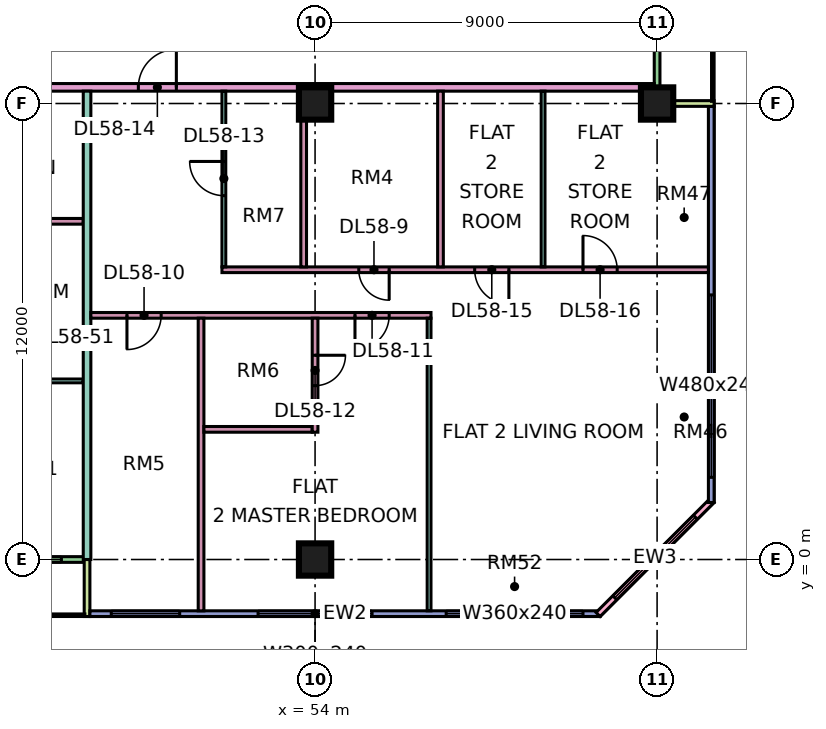
"""IFC4 building model, lengths in metres.
Left out: names, types, materials, properties, quantities, classifications, styles, units other than length and angle.
Written with IfcOpenShell. Run it as: python <this file> out.ifc"""

import sys

from ifc_helpers import new_model, si_unit, direction, frame, frame_2d, origin, origin_2d, place, context, subcontext, project, spatial, rectangle, extrude, element, fill, save


model = new_model("IFC4")
c1 = context("Model", 3, precision=1e-05, world=origin(), true_north=direction((0.0, 1.0)))
c2 = subcontext(c1, "Body", "Model", "MODEL_VIEW")
j1 = project(units=[si_unit("LENGTHUNIT", "METRE"), si_unit("PLANEANGLEUNIT", "RADIAN")], contexts=[c1])
p1 = place(None, origin())
s1 = spatial("IfcSite", under=j1, at=p1, CompositionType="ELEMENT")
p2 = place(p1, origin())
s2 = spatial("IfcBuilding", under=s1, at=p2, CompositionType="ELEMENT")
p3 = place(p2, frame((0.0, 0.0, 245.4)))
s3 = spatial("IfcBuildingStorey", under=s2, at=p3, CompositionType="ELEMENT", Elevation=245.4)
for number, where, z_axis, x_axis in (
    (1, (54.0, 0.0, 0.0), (0.0, 0.0, 1.0), (1.0, 0.0, 0.0)),
    (2, (54.0, 12.0, 0.0), (0.0, 0.0, 1.0), (1.0, 0.0, 0.0)),
    (3, (63.0, 12.0, 0.0), (0.0, 0.0, 1.0), (1.0, 0.0, 0.0)),
):
    element("IfcColumn", number, at=place(p3, frame(where, z_axis=z_axis, x_axis=x_axis)), inside=s3, PredefinedType="COLUMN", context=c2, shape_type="SweptSolid", body=[
        extrude(rectangle(XDim=0.85, YDim=0.85, at=origin_2d()), origin(), (0.0, 0.0, 1.0), 3.75),
    ])
p4 = place(p3, frame((36.075, 0.0, 0.0), z_axis=(0.0, 0.0, 1.0), x_axis=(1.0, 0.0, 0.0)))
e4 = element("IfcWall", 4, at=p4, inside=s3, PredefinedType="SOLIDWALL", context=c2, shape_type="SweptSolid", body=[
    extrude(rectangle(XDim=11.85, YDim=0.15, at=frame_2d((5.925, 0.0))), origin(), (0.0, 0.0, 1.0), 3.35),
])
p5 = place(p4, frame((2.288, 0.0, 0.0)))
e5 = element("IfcOpeningElement", 5, at=p5, cuts=e4, PredefinedType="OPENING", context=c2, shape_type="SweptSolid", body=[
    extrude(rectangle(XDim=1.8, YDim=2.4, at=frame_2d((0.9, 1.2))), frame((0.0, 0.085, 0.0), z_axis=(0.0, -1.0, 0.0), x_axis=(1.0, 0.0, 0.0)), (0.0, 0.0, 1.0), 0.17),
])
p6 = place(p4, frame((6.562, 0.0, 0.45)))
e6 = element("IfcOpeningElement", 6, at=p6, cuts=e4, PredefinedType="OPENING", context=c2, shape_type="SweptSolid", body=[
    extrude(rectangle(XDim=1.2, YDim=2.4, at=frame_2d((0.6, 1.2))), frame((0.0, 0.085, 0.0), z_axis=(0.0, -1.0, 0.0), x_axis=(1.0, 0.0, 0.0)), (0.0, 0.0, 1.0), 0.17),
])
p7 = place(p4, frame((10.05, 0.0, 0.45)))
e7 = element("IfcOpeningElement", 7, at=p7, cuts=e4, PredefinedType="OPENING", context=c2, shape_type="SweptSolid", body=[
    extrude(rectangle(XDim=1.2, YDim=2.4, at=frame_2d((0.6, 1.2))), frame((0.0, 0.085, 0.0), z_axis=(0.0, -1.0, 0.0), x_axis=(1.0, 0.0, 0.0)), (0.0, 0.0, 1.0), 0.17),
])
p8 = place(p3, frame((48.0, -1.5, 0.0), z_axis=(0.0, 0.0, 1.0), x_axis=(0.0, 1.0, 0.0)))
e8 = element("IfcWall", 8, at=p8, inside=s3, PredefinedType="SOLIDWALL", context=c2, shape_type="SweptSolid", body=[
    extrude(rectangle(XDim=1.5, YDim=0.15, at=frame_2d((0.75, 0.0))), origin(), (0.0, 0.0, 1.0), 3.35),
])
p9 = place(p3, frame((48.075, -1.425, 0.0), z_axis=(0.0, 0.0, 1.0), x_axis=(1.0, 0.0, 0.0)))
e9 = element("IfcWall", 9, at=p9, inside=s3, PredefinedType="SOLIDWALL", context=c2, shape_type="SweptSolid", body=[
    extrude(rectangle(XDim=13.425, YDim=0.15, at=frame_2d((6.712, 0.0))), origin(), (0.0, 0.0, 1.0), 3.35),
])
p10 = place(p9, frame((0.562, 0.0, 0.45)))
e10 = element("IfcOpeningElement", 10, at=p10, cuts=e9, PredefinedType="OPENING", context=c2, shape_type="SweptSolid", body=[
    extrude(rectangle(XDim=1.8, YDim=2.4, at=frame_2d((0.9, 1.2))), frame((0.0, 0.085, 0.0), z_axis=(0.0, -1.0, 0.0), x_axis=(1.0, 0.0, 0.0)), (0.0, 0.0, 1.0), 0.17),
])
p11 = place(p9, frame((4.425, 0.0, 0.45)))
e11 = element("IfcOpeningElement", 11, at=p11, cuts=e9, PredefinedType="OPENING", context=c2, shape_type="SweptSolid", body=[
    extrude(rectangle(XDim=3.0, YDim=2.4, at=frame_2d((1.5, 1.2))), frame((0.0, 0.085, 0.0), z_axis=(0.0, -1.0, 0.0), x_axis=(1.0, 0.0, 0.0)), (0.0, 0.0, 1.0), 0.17),
])
p12 = place(p9, frame((9.375, 0.0, 0.45)))
e12 = element("IfcOpeningElement", 12, at=p12, cuts=e9, PredefinedType="OPENING", context=c2, shape_type="SweptSolid", body=[
    extrude(rectangle(XDim=3.6, YDim=2.4, at=frame_2d((1.8, 1.2))), frame((0.0, 0.085, 0.0), z_axis=(0.0, -1.0, 0.0), x_axis=(1.0, 0.0, 0.0)), (0.0, 0.0, 1.0), 0.17),
])
p13 = place(p3, frame((61.447, -1.447, 0.0), z_axis=(0.0, 0.0, 1.0), x_axis=(0.707106781187, 0.707106781187, 0.0)))
e13 = element("IfcWall", 13, at=p13, inside=s3, PredefinedType="SOLIDWALL", context=c2, shape_type="SweptSolid", body=[
    extrude(rectangle(XDim=4.243, YDim=0.15, at=frame_2d((2.121, 0.0))), origin(), (0.0, 0.0, 1.0), 3.35),
])
p14 = place(p13, frame((0.621, 0.0, 0.45)))
e14 = element("IfcOpeningElement", 14, at=p14, cuts=e13, PredefinedType="OPENING", context=c2, shape_type="SweptSolid", body=[
    extrude(rectangle(XDim=3.0, YDim=2.4, at=frame_2d((1.5, 1.2))), frame((0.0, 0.085, 0.0), z_axis=(0.0, -1.0, 0.0), x_axis=(1.0, 0.0, 0.0)), (0.0, 0.0, 1.0), 0.17),
])
p15 = place(p3, frame((64.425, 1.5, 0.0), z_axis=(0.0, 0.0, 1.0), x_axis=(0.0, 1.0, 0.0)))
e15 = element("IfcWall", 15, at=p15, inside=s3, PredefinedType="SOLIDWALL", context=c2, shape_type="SweptSolid", body=[
    extrude(rectangle(XDim=10.425, YDim=0.15, at=frame_2d((5.212, 0.0))), origin(), (0.0, 0.0, 1.0), 3.35),
])
p16 = place(p15, frame((0.663, 0.0, 0.45)))
e16 = element("IfcOpeningElement", 16, at=p16, cuts=e15, PredefinedType="OPENING", context=c2, shape_type="SweptSolid", body=[
    extrude(rectangle(XDim=4.8, YDim=2.4, at=frame_2d((2.4, 1.2))), frame((0.0, 0.085, 0.0), z_axis=(0.0, -1.0, 0.0), x_axis=(1.0, 0.0, 0.0)), (0.0, 0.0, 1.0), 0.17),
])
p17 = place(p3, frame((63.0, 12.075, 0.0), z_axis=(0.0, 0.0, 1.0), x_axis=(0.0, 1.0, 0.0)))
e17 = element("IfcWall", 17, at=p17, inside=s3, PredefinedType="SOLIDWALL", context=c2, shape_type="SweptSolid", body=[
    extrude(rectangle(XDim=10.35, YDim=0.15, at=frame_2d((5.175, 0.0))), origin(), (0.0, 0.0, 1.0), 3.35),
])
p18 = place(p17, frame((4.875, 0.0, 0.0)))
e18 = element("IfcOpeningElement", 18, at=p18, cuts=e17, PredefinedType="OPENING", context=c2, shape_type="SweptSolid", body=[
    extrude(rectangle(XDim=1.8, YDim=2.4, at=frame_2d((0.9, 1.2))), frame((0.0, 0.085, 0.0), z_axis=(0.0, -1.0, 0.0), x_axis=(1.0, 0.0, 0.0)), (0.0, 0.0, 1.0), 0.17),
])
p19 = place(p17, frame((8.587, 0.0, 0.45)))
e19 = element("IfcOpeningElement", 19, at=p19, cuts=e17, PredefinedType="OPENING", context=c2, shape_type="SweptSolid", body=[
    extrude(rectangle(XDim=1.2, YDim=2.4, at=frame_2d((0.6, 1.2))), frame((0.0, 0.085, 0.0), z_axis=(0.0, -1.0, 0.0), x_axis=(1.0, 0.0, 0.0)), (0.0, 0.0, 1.0), 0.17),
])
p20 = place(p3, frame((64.5, 12.0, 0.0), z_axis=(0.0, 0.0, 1.0), x_axis=(-1.0, 0.0, 0.0)))
e20 = element("IfcWall", 20, at=p20, inside=s3, PredefinedType="SOLIDWALL", context=c2, shape_type="SweptSolid", body=[
    extrude(rectangle(XDim=1.5, YDim=0.15, at=frame_2d((0.75, 0.0))), origin(), (0.0, 0.0, 1.0), 3.35),
])
p21 = place(p3, frame((33.05, 4.7, 0.0), z_axis=(0.0, 0.0, 1.0), x_axis=(1.0, 0.0, 0.0)))
e21 = element("IfcWall", 21, at=p21, inside=s3, PredefinedType="PARTITIONING", context=c2, shape_type="SweptSolid", body=[
    extrude(rectangle(XDim=14.85, YDim=0.1, at=frame_2d((7.425, 0.0))), origin(), (0.0, 0.0, 1.0), 3.35),
])
p22 = place(p21, frame((10.0, 0.0, 0.0)))
e22 = element("IfcOpeningElement", 22, at=p22, cuts=e21, PredefinedType="OPENING", context=c2, shape_type="SweptSolid", body=[
    extrude(rectangle(XDim=0.9, YDim=2.1, at=frame_2d((0.45, 1.05))), frame((0.0, 0.06, 0.0), z_axis=(0.0, -1.0, 0.0), x_axis=(1.0, 0.0, 0.0)), (0.0, 0.0, 1.0), 0.12),
])
p23 = place(p21, frame((13.0, 0.0, 0.0)))
e23 = element("IfcOpeningElement", 23, at=p23, cuts=e21, PredefinedType="OPENING", context=c2, shape_type="SweptSolid", body=[
    extrude(rectangle(XDim=0.9, YDim=2.1, at=frame_2d((0.45, 1.05))), frame((0.0, 0.06, 0.0), z_axis=(0.0, -1.0, 0.0), x_axis=(1.0, 0.0, 0.0)), (0.0, 0.0, 1.0), 0.12),
])
p24 = place(p21, frame((4.0, 0.0, 0.0)))
e24 = element("IfcOpeningElement", 24, at=p24, cuts=e21, PredefinedType="OPENING", context=c2, shape_type="SweptSolid", body=[
    extrude(rectangle(XDim=0.9, YDim=2.1, at=frame_2d((0.45, 1.05))), frame((0.0, 0.06, 0.0), z_axis=(0.0, -1.0, 0.0), x_axis=(1.0, 0.0, 0.0)), (0.0, 0.0, 1.0), 0.12),
])
p25 = place(p3, frame((40.65, 12.425, 0.0), z_axis=(0.0, 0.0, 1.0), x_axis=(1.0, 0.0, 0.0)))
e25 = element("IfcWall", 25, at=p25, inside=s3, PredefinedType="PARTITIONING", context=c2, shape_type="SweptSolid", body=[
    extrude(rectangle(XDim=22.276, YDim=0.2, at=frame_2d((11.138, 0.0))), origin(), (0.0, 0.0, 1.0), 3.35),
])
p26 = place(p25, frame((8.7, 0.0, 0.0)))
e26 = element("IfcOpeningElement", 26, at=p26, cuts=e25, PredefinedType="OPENING", context=c2, shape_type="SweptSolid", body=[
    extrude(rectangle(XDim=1.0, YDim=2.1, at=frame_2d((0.5, 1.05))), frame((0.0, 0.11, 0.0), z_axis=(0.0, -1.0, 0.0), x_axis=(1.0, 0.0, 0.0)), (0.0, 0.0, 1.0), 0.22),
])
p27 = place(p25, frame((1.05, 0.0, 0.0)))
e27 = element("IfcOpeningElement", 27, at=p27, cuts=e25, PredefinedType="OPENING", context=c2, shape_type="SweptSolid", body=[
    extrude(rectangle(XDim=1.0, YDim=2.1, at=frame_2d((0.5, 1.05))), frame((0.0, 0.11, 0.0), z_axis=(0.0, -1.0, 0.0), x_axis=(1.0, 0.0, 0.0)), (0.0, 0.0, 1.0), 0.22),
])
p28 = place(p3, frame((43.725, 5.9, 0.0), z_axis=(0.0, 0.0, 1.0), x_axis=(1.0, 0.0, 0.0)))
e28 = element("IfcWall", 28, at=p28, inside=s3, PredefinedType="PARTITIONING", context=c2, shape_type="SweptSolid", body=[
    extrude(rectangle(XDim=4.175, YDim=0.15, at=frame_2d((2.087, 0.0))), origin(), (0.0, 0.0, 1.0), 3.35),
])
p29 = place(p28, frame((1.675, 0.0, 0.0)))
e29 = element("IfcOpeningElement", 29, at=p29, cuts=e28, PredefinedType="OPENING", context=c2, shape_type="SweptSolid", body=[
    extrude(rectangle(XDim=0.8, YDim=2.1, at=frame_2d((0.4, 1.05))), frame((0.0, 0.085, 0.0), z_axis=(0.0, -1.0, 0.0), x_axis=(1.0, 0.0, 0.0)), (0.0, 0.0, 1.0), 0.17),
])
p30 = place(p3, frame((43.725, 8.9, 0.0), z_axis=(0.0, 0.0, 1.0), x_axis=(1.0, 0.0, 0.0)))
e30 = element("IfcWall", 30, at=p30, inside=s3, PredefinedType="PARTITIONING", context=c2, shape_type="SweptSolid", body=[
    extrude(rectangle(XDim=4.175, YDim=0.15, at=frame_2d((2.087, 0.0))), origin(), (0.0, 0.0, 1.0), 3.35),
])
p31 = place(p3, frame((48.0, 0.0, 0.0), z_axis=(0.0, 0.0, 1.0), x_axis=(0.0, 1.0, 0.0)))
e31 = element("IfcWall", 31, at=p31, inside=s3, PredefinedType="PARTITIONING", context=c2, shape_type="SweptSolid", body=[
    extrude(rectangle(XDim=12.325, YDim=0.2, at=frame_2d((6.163, 0.0))), origin(), (0.0, 0.0, 1.0), 3.35),
])
p32 = place(p3, frame((48.1, 6.425, 0.0), z_axis=(0.0, 0.0, 1.0), x_axis=(1.0, 0.0, 0.0)))
e32 = element("IfcWall", 32, at=p32, inside=s3, PredefinedType="PARTITIONING", context=c2, shape_type="SweptSolid", body=[
    extrude(rectangle(XDim=8.95, YDim=0.15, at=frame_2d((4.475, 0.0))), origin(), (0.0, 0.0, 1.0), 3.35),
])
p33 = place(p32, frame((0.95, 0.0, 0.0)))
e33 = element("IfcOpeningElement", 33, at=p33, cuts=e32, PredefinedType="OPENING", context=c2, shape_type="SweptSolid", body=[
    extrude(rectangle(XDim=0.9, YDim=2.1, at=frame_2d((0.45, 1.05))), frame((0.0, 0.085, 0.0), z_axis=(0.0, -1.0, 0.0), x_axis=(1.0, 0.0, 0.0)), (0.0, 0.0, 1.0), 0.17),
])
p34 = place(p32, frame((6.95, 0.0, 0.0)))
e34 = element("IfcOpeningElement", 34, at=p34, cuts=e32, PredefinedType="OPENING", context=c2, shape_type="SweptSolid", body=[
    extrude(rectangle(XDim=0.9, YDim=2.1, at=frame_2d((0.45, 1.05))), frame((0.0, 0.085, 0.0), z_axis=(0.0, -1.0, 0.0), x_axis=(1.0, 0.0, 0.0)), (0.0, 0.0, 1.0), 0.17),
])
p35 = place(p3, frame((51.0, -1.351, 0.0), z_axis=(0.0, 0.0, 1.0), x_axis=(0.0, 1.0, 0.0)))
e35 = element("IfcWall", 35, at=p35, inside=s3, PredefinedType="PARTITIONING", context=c2, shape_type="SweptSolid", body=[
    extrude(rectangle(XDim=7.701, YDim=0.15, at=frame_2d((3.851, 0.0))), origin(), (0.0, 0.0, 1.0), 3.35),
])
p36 = place(p3, frame((51.075, 3.425, 0.0), z_axis=(0.0, 0.0, 1.0), x_axis=(1.0, 0.0, 0.0)))
e36 = element("IfcWall", 36, at=p36, inside=s3, PredefinedType="PARTITIONING", context=c2, shape_type="SweptSolid", body=[
    extrude(rectangle(XDim=2.85, YDim=0.15, at=frame_2d((1.425, 0.0))), origin(), (0.0, 0.0, 1.0), 3.35),
])
p37 = place(p3, frame((51.55, 7.625, 0.0), z_axis=(0.0, 0.0, 1.0), x_axis=(1.0, 0.0, 0.0)))
e37 = element("IfcWall", 37, at=p37, inside=s3, PredefinedType="PARTITIONING", context=c2, shape_type="SweptSolid", body=[
    extrude(rectangle(XDim=12.8, YDim=0.15, at=frame_2d((6.4, 0.0))), origin(), (0.0, 0.0, 1.0), 3.35),
])
p38 = place(p37, frame((3.6, 0.0, 0.0)))
e38 = element("IfcOpeningElement", 38, at=p38, cuts=e37, PredefinedType="OPENING", context=c2, shape_type="SweptSolid", body=[
    extrude(rectangle(XDim=0.8, YDim=2.1, at=frame_2d((0.4, 1.05))), frame((0.0, 0.085, 0.0), z_axis=(0.0, -1.0, 0.0), x_axis=(1.0, 0.0, 0.0)), (0.0, 0.0, 1.0), 0.17),
])
p39 = place(p37, frame((6.65, 0.0, 0.0)))
e39 = element("IfcOpeningElement", 39, at=p39, cuts=e37, PredefinedType="OPENING", context=c2, shape_type="SweptSolid", body=[
    extrude(rectangle(XDim=0.9, YDim=2.1, at=frame_2d((0.45, 1.05))), frame((0.0, 0.085, 0.0), z_axis=(0.0, -1.0, 0.0), x_axis=(1.0, 0.0, 0.0)), (0.0, 0.0, 1.0), 0.17),
])
p40 = place(p37, frame((9.5, 0.0, 0.0)))
e40 = element("IfcOpeningElement", 40, at=p40, cuts=e37, PredefinedType="OPENING", context=c2, shape_type="SweptSolid", body=[
    extrude(rectangle(XDim=0.9, YDim=2.1, at=frame_2d((0.45, 1.05))), frame((0.0, 0.085, 0.0), z_axis=(0.0, -1.0, 0.0), x_axis=(1.0, 0.0, 0.0)), (0.0, 0.0, 1.0), 0.17),
])
p41 = place(p3, frame((51.6, 7.7, 0.0), z_axis=(0.0, 0.0, 1.0), x_axis=(0.0, 1.0, 0.0)))
e41 = element("IfcWall", 41, at=p41, inside=s3, PredefinedType="PARTITIONING", context=c2, shape_type="SweptSolid", body=[
    extrude(rectangle(XDim=4.625, YDim=0.1, at=frame_2d((2.312, 0.0))), origin(), (0.0, 0.0, 1.0), 3.35),
])
p42 = place(p41, frame((1.875, 0.0, 0.0)))
e42 = element("IfcOpeningElement", 42, at=p42, cuts=e41, PredefinedType="OPENING", context=c2, shape_type="SweptSolid", body=[
    extrude(rectangle(XDim=0.9, YDim=2.1, at=frame_2d((0.45, 1.05))), frame((0.0, 0.06, 0.0), z_axis=(0.0, -1.0, 0.0), x_axis=(1.0, 0.0, 0.0)), (0.0, 0.0, 1.0), 0.12),
])
p43 = place(p3, frame((53.7, 7.7, 0.0), z_axis=(0.0, 0.0, 1.0), x_axis=(0.0, 1.0, 0.0)))
e43 = element("IfcWall", 43, at=p43, inside=s3, PredefinedType="PARTITIONING", context=c2, shape_type="SweptSolid", body=[
    extrude(rectangle(XDim=4.625, YDim=0.15, at=frame_2d((2.312, 0.0))), origin(), (0.0, 0.0, 1.0), 3.35),
])
p44 = place(p3, frame((54.0, 3.35, 0.0), z_axis=(0.0, 0.0, 1.0), x_axis=(0.0, 1.0, 0.0)))
e44 = element("IfcWall", 44, at=p44, inside=s3, PredefinedType="PARTITIONING", context=c2, shape_type="SweptSolid", body=[
    extrude(rectangle(XDim=3.0, YDim=0.15, at=frame_2d((1.5, 0.0))), origin(), (0.0, 0.0, 1.0), 3.35),
])
p45 = place(p44, frame((1.225, 0.0, 0.0)))
e45 = element("IfcOpeningElement", 45, at=p45, cuts=e44, PredefinedType="OPENING", context=c2, shape_type="SweptSolid", body=[
    extrude(rectangle(XDim=0.8, YDim=2.1, at=frame_2d((0.4, 1.05))), frame((0.0, 0.085, 0.0), z_axis=(0.0, -1.0, 0.0), x_axis=(1.0, 0.0, 0.0)), (0.0, 0.0, 1.0), 0.17),
])
p46 = place(p3, frame((57.0, -1.35, 0.0), z_axis=(0.0, 0.0, 1.0), x_axis=(0.0, 1.0, 0.0)))
e46 = element("IfcWall", 46, at=p46, inside=s3, PredefinedType="PARTITIONING", context=c2, shape_type="SweptSolid", body=[
    extrude(rectangle(XDim=7.7, YDim=0.1, at=frame_2d((3.85, 0.0))), origin(), (0.0, 0.0, 1.0), 3.35),
])
p47 = place(p3, frame((57.3, 7.7, 0.0), z_axis=(0.0, 0.0, 1.0), x_axis=(0.0, 1.0, 0.0)))
e47 = element("IfcWall", 47, at=p47, inside=s3, PredefinedType="PARTITIONING", context=c2, shape_type="SweptSolid", body=[
    extrude(rectangle(XDim=4.625, YDim=0.15, at=frame_2d((2.312, 0.0))), origin(), (0.0, 0.0, 1.0), 3.35),
])
p48 = place(p3, frame((60.0, 7.7, 0.0), z_axis=(0.0, 0.0, 1.0), x_axis=(0.0, 1.0, 0.0)))
e48 = element("IfcWall", 48, at=p48, inside=s3, PredefinedType="PARTITIONING", context=c2, shape_type="SweptSolid", body=[
    extrude(rectangle(XDim=4.625, YDim=0.1, at=frame_2d((2.312, 0.0))), origin(), (0.0, 0.0, 1.0), 3.35),
])
p49 = place(p7, origin())
e49 = element("IfcWindow", 49, at=p49, inside=s3, PartitioningType="SINGLE_PANEL", PredefinedType="WINDOW", context=c2, shape_type="SweptSolid", body=[
    extrude(rectangle(XDim=1.2, YDim=2.4, at=frame_2d((0.6, 1.2))), frame((0.0, 0.03, 0.0), z_axis=(0.0, -1.0, 0.0), x_axis=(1.0, 0.0, 0.0)), (0.0, 0.0, 1.0), 0.06),
])
fill(e7, e49)
p50 = place(p10, origin())
e50 = element("IfcWindow", 50, at=p50, inside=s3, PartitioningType="SINGLE_PANEL", PredefinedType="WINDOW", context=c2, shape_type="SweptSolid", body=[
    extrude(rectangle(XDim=1.8, YDim=2.4, at=frame_2d((0.9, 1.2))), frame((0.0, 0.03, 0.0), z_axis=(0.0, -1.0, 0.0), x_axis=(1.0, 0.0, 0.0)), (0.0, 0.0, 1.0), 0.06),
])
fill(e10, e50)
p51 = place(p11, origin())
e51 = element("IfcWindow", 51, at=p51, inside=s3, PartitioningType="SINGLE_PANEL", PredefinedType="WINDOW", context=c2, shape_type="SweptSolid", body=[
    extrude(rectangle(XDim=3.0, YDim=2.4, at=frame_2d((1.5, 1.2))), frame((0.0, 0.03, 0.0), z_axis=(0.0, -1.0, 0.0), x_axis=(1.0, 0.0, 0.0)), (0.0, 0.0, 1.0), 0.06),
])
fill(e11, e51)
p52 = place(p12, origin())
e52 = element("IfcWindow", 52, at=p52, inside=s3, PartitioningType="SINGLE_PANEL", PredefinedType="WINDOW", context=c2, shape_type="SweptSolid", body=[
    extrude(rectangle(XDim=3.6, YDim=2.4, at=frame_2d((1.8, 1.2))), frame((0.0, 0.03, 0.0), z_axis=(0.0, -1.0, 0.0), x_axis=(1.0, 0.0, 0.0)), (0.0, 0.0, 1.0), 0.06),
])
fill(e12, e52)
p53 = place(p14, origin())
e53 = element("IfcWindow", 53, at=p53, inside=s3, PartitioningType="SINGLE_PANEL", PredefinedType="WINDOW", context=c2, shape_type="SweptSolid", body=[
    extrude(rectangle(XDim=3.0, YDim=2.4, at=frame_2d((1.5, 1.2))), frame((0.0, 0.03, 0.0), z_axis=(0.0, -1.0, 0.0), x_axis=(1.0, 0.0, 0.0)), (0.0, 0.0, 1.0), 0.06),
])
fill(e14, e53)
p54 = place(p16, origin())
e54 = element("IfcWindow", 54, at=p54, inside=s3, PartitioningType="SINGLE_PANEL", PredefinedType="WINDOW", context=c2, shape_type="SweptSolid", body=[
    extrude(rectangle(XDim=4.8, YDim=2.4, at=frame_2d((2.4, 1.2))), frame((0.0, 0.03, 0.0), z_axis=(0.0, -1.0, 0.0), x_axis=(1.0, 0.0, 0.0)), (0.0, 0.0, 1.0), 0.06),
])
fill(e16, e54)
p55 = place(p38, origin())
e55 = element("IfcDoor", 55, at=p55, inside=s3, OperationType="SINGLE_SWING_RIGHT", PredefinedType="DOOR", context=c2, shape_type="SweptSolid", body=[
    extrude(rectangle(XDim=0.8, YDim=2.1, at=frame_2d((0.4, 1.05))), frame((0.0, 0.025, 0.0), z_axis=(0.0, -1.0, 0.0), x_axis=(1.0, 0.0, 0.0)), (0.0, 0.0, 1.0), 0.05),
])
fill(e38, e55)
p56 = place(p33, frame((0.9, 0.0, 0.0), z_axis=(0.0, 0.0, 1.0), x_axis=(-1.0, 0.0, 0.0)))
e56 = element("IfcDoor", 56, at=p56, inside=s3, OperationType="SINGLE_SWING_LEFT", PredefinedType="DOOR", context=c2, shape_type="SweptSolid", body=[
    extrude(rectangle(XDim=0.9, YDim=2.1, at=frame_2d((0.45, 1.05))), frame((0.0, 0.025, 0.0), z_axis=(0.0, -1.0, 0.0), x_axis=(1.0, 0.0, 0.0)), (0.0, 0.0, 1.0), 0.05),
])
fill(e33, e56)
p57 = place(p34, frame((0.9, 0.0, 0.0), z_axis=(0.0, 0.0, 1.0), x_axis=(-1.0, 0.0, 0.0)))
e57 = element("IfcDoor", 57, at=p57, inside=s3, OperationType="SINGLE_SWING_LEFT", PredefinedType="DOOR", context=c2, shape_type="SweptSolid", body=[
    extrude(rectangle(XDim=0.9, YDim=2.1, at=frame_2d((0.45, 1.05))), frame((0.0, 0.025, 0.0), z_axis=(0.0, -1.0, 0.0), x_axis=(1.0, 0.0, 0.0)), (0.0, 0.0, 1.0), 0.05),
])
fill(e34, e57)
p58 = place(p45, origin())
e58 = element("IfcDoor", 58, at=p58, inside=s3, OperationType="SINGLE_SWING_RIGHT", PredefinedType="DOOR", context=c2, shape_type="SweptSolid", body=[
    extrude(rectangle(XDim=0.8, YDim=2.1, at=frame_2d((0.4, 1.05))), frame((0.0, 0.025, 0.0), z_axis=(0.0, -1.0, 0.0), x_axis=(1.0, 0.0, 0.0)), (0.0, 0.0, 1.0), 0.05),
])
fill(e45, e58)
p59 = place(p42, frame((0.9, 0.0, 0.0), z_axis=(0.0, 0.0, 1.0), x_axis=(-1.0, 0.0, 0.0)))
e59 = element("IfcDoor", 59, at=p59, inside=s3, OperationType="SINGLE_SWING_RIGHT", PredefinedType="DOOR", context=c2, shape_type="SweptSolid", body=[
    extrude(rectangle(XDim=0.9, YDim=2.1, at=frame_2d((0.45, 1.05))), frame((0.0, 0.025, 0.0), z_axis=(0.0, -1.0, 0.0), x_axis=(1.0, 0.0, 0.0)), (0.0, 0.0, 1.0), 0.05),
])
fill(e42, e59)
p60 = place(p26, frame((1.0, 0.0, 0.0), z_axis=(0.0, 0.0, 1.0), x_axis=(-1.0, 0.0, 0.0)))
e60 = element("IfcDoor", 60, at=p60, inside=s3, OperationType="SINGLE_SWING_RIGHT", PredefinedType="DOOR", context=c2, shape_type="SweptSolid", body=[
    extrude(rectangle(XDim=1.0, YDim=2.1, at=frame_2d((0.5, 1.05))), frame((0.0, 0.025, 0.0), z_axis=(0.0, -1.0, 0.0), x_axis=(1.0, 0.0, 0.0)), (0.0, 0.0, 1.0), 0.05),
])
fill(e26, e60)
p61 = place(p39, origin())
e61 = element("IfcDoor", 61, at=p61, inside=s3, OperationType="SINGLE_SWING_RIGHT", PredefinedType="DOOR", context=c2, shape_type="SweptSolid", body=[
    extrude(rectangle(XDim=0.9, YDim=2.1, at=frame_2d((0.45, 1.05))), frame((0.0, 0.025, 0.0), z_axis=(0.0, -1.0, 0.0), x_axis=(1.0, 0.0, 0.0)), (0.0, 0.0, 1.0), 0.05),
])
fill(e39, e61)
p62 = place(p40, origin())
e62 = element("IfcDoor", 62, at=p62, inside=s3, OperationType="SINGLE_SWING_LEFT", PredefinedType="DOOR", context=c2, shape_type="SweptSolid", body=[
    extrude(rectangle(XDim=0.9, YDim=2.1, at=frame_2d((0.45, 1.05))), frame((0.0, 0.025, 0.0), z_axis=(0.0, -1.0, 0.0), x_axis=(1.0, 0.0, 0.0)), (0.0, 0.0, 1.0), 0.05),
])
fill(e40, e62)
save(model, sys.argv[1])
